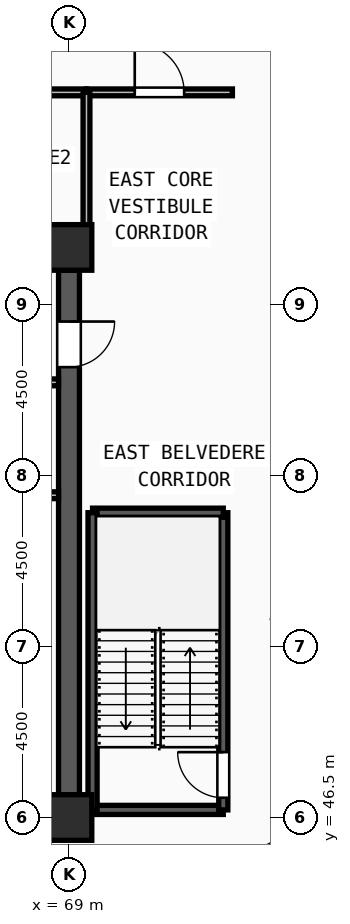
"""IFC4 building model, lengths in metres.
Left out: names, types, materials, properties, quantities, classifications, styles, units other than length and angle.
Written with IfcOpenShell. Run it as: python <this file> out.ifc"""

import sys

from ifc_helpers import new_model, si_unit, direction, frame, frame_2d, origin, origin_2d, place, context, subcontext, project, spatial, rectangle, extrude, source, transform, mapped, element, fill, save


model = new_model("IFC4")
c1 = context("Model", 3, precision=1e-05, world=origin(), true_north=direction((0.0, 1.0)))
c2 = subcontext(c1, "Body", "Model", "MODEL_VIEW")
j1 = project(units=[si_unit("LENGTHUNIT", "METRE"), si_unit("PLANEANGLEUNIT", "RADIAN")], contexts=[c1])
p1 = place(None, origin())
s1 = spatial("IfcSite", under=j1, at=p1, CompositionType="ELEMENT")
p2 = place(p1, origin())
s2 = spatial("IfcBuilding", under=s1, at=p2, CompositionType="ELEMENT")
p3 = place(p2, frame((0.0, 0.0, 339.75)))
s3 = spatial("IfcBuildingStorey", under=s2, at=p3, CompositionType="ELEMENT", Elevation=339.75)
m1 = source(origin(), c2, "Body", "SweptSolid", [
    extrude(rectangle(XDim=1.2, YDim=1.2, at=origin_2d()), origin(), (0.0, 0.0, 1.0), 3.75),
])
for number, where, z_axis, x_axis in (
    (1, (69.0, 46.5, 0.0), (0.0, 0.0, 1.0), (1.0, 0.0, 0.0)),
    (2, (69.0, 61.5, 0.0), (0.0, 0.0, 1.0), (1.0, 0.0, 0.0)),
):
    element("IfcColumn", number, at=place(p3, frame(where, z_axis=z_axis, x_axis=x_axis)), inside=s3, PredefinedType="COLUMN", context=c2, shape_type="MappedRepresentation", body=[
        mapped(m1, transform((0.0, 0.0, 0.0), x_axis=(1.0, 0.0, 0.0), y_axis=(0.0, 1.0, 0.0), z_axis=(0.0, 0.0, 1.0), scale=1.0)),
    ])
p4 = place(p3, frame((69.0, 60.9, 0.0), z_axis=(0.0, 0.0, 1.0), x_axis=(0.0, -1.0, 0.0)))
e3 = element("IfcWall", 3, at=p4, inside=s3, PredefinedType="SHEAR", context=c2, shape_type="SweptSolid", body=[
    extrude(rectangle(XDim=13.8, YDim=0.55, at=frame_2d((6.9, 0.0))), origin(), (0.0, 0.0, 1.0), 3.57),
])
m2 = source(origin(), c2, "Body", "SweptSolid", [
    extrude(rectangle(XDim=1.2, YDim=2.2, at=frame_2d((0.6, 1.1))), frame((0.0, 0.285, 0.0), z_axis=(0.0, -1.0, 0.0), x_axis=(1.0, 0.0, 0.0)), (0.0, 0.0, 1.0), 0.57),
])
p5 = place(p4, frame((1.35, 0.0, 0.0)))
e4 = element("IfcOpeningElement", 4, at=p5, cuts=e3, PredefinedType="OPENING", context=c2, shape_type="MappedRepresentation", body=[
    mapped(m2, transform((0.0, 0.0, 0.0), x_axis=(1.0, 0.0, 0.0), y_axis=(0.0, 1.0, 0.0), z_axis=(0.0, 0.0, 1.0), scale=1.0)),
])
p6 = place(p3, frame((69.62, 46.7, 0.0), z_axis=(0.0, 0.0, 1.0), x_axis=(1.0, 0.0, 0.0)))
e5 = element("IfcWall", 5, at=p6, inside=s3, PredefinedType="SOLIDWALL", context=c2, shape_type="SweptSolid", body=[
    extrude(rectangle(XDim=3.44, YDim=0.24, at=frame_2d((1.72, 0.0))), origin(), (0.0, 0.0, 1.0), 3.57),
])
p7 = place(p3, frame((73.06, 46.7, 0.0), z_axis=(0.0, 0.0, 1.0), x_axis=(0.0, 1.0, 0.0)))
e6 = element("IfcWall", 6, at=p7, inside=s3, PredefinedType="SOLIDWALL", context=c2, shape_type="SweptSolid", body=[
    extrude(rectangle(XDim=7.82, YDim=0.24, at=frame_2d((3.91, 0.0))), origin(), (0.0, 0.0, 1.0), 3.57),
])
m3 = source(origin(), c2, "Body", "SweptSolid", [
    extrude(rectangle(XDim=1.2, YDim=2.2, at=frame_2d((0.6, 1.1))), frame((0.0, 0.13, 0.0), z_axis=(0.0, -1.0, 0.0), x_axis=(1.0, 0.0, 0.0)), (0.0, 0.0, 1.0), 0.26),
])
p8 = place(p7, frame((0.32, 0.0, 0.0)))
e7 = element("IfcOpeningElement", 7, at=p8, cuts=e6, PredefinedType="OPENING", context=c2, shape_type="MappedRepresentation", body=[
    mapped(m3, transform((0.0, 0.0, 0.0), x_axis=(1.0, 0.0, 0.0), y_axis=(0.0, 1.0, 0.0), z_axis=(0.0, 0.0, 1.0), scale=1.0)),
])
p9 = place(p3, frame((73.06, 54.52, 0.0), z_axis=(0.0, 0.0, 1.0), x_axis=(-1.0, 0.0, 0.0)))
e8 = element("IfcWall", 8, at=p9, inside=s3, PredefinedType="SOLIDWALL", context=c2, shape_type="SweptSolid", body=[
    extrude(rectangle(XDim=3.44, YDim=0.24, at=frame_2d((1.72, 0.0))), origin(), (0.0, 0.0, 1.0), 3.57),
])
p10 = place(p3, frame((69.62, 54.52, 0.0), z_axis=(0.0, 0.0, 1.0), x_axis=(0.0, -1.0, 0.0)))
e9 = element("IfcWall", 9, at=p10, inside=s3, PredefinedType="SOLIDWALL", context=c2, shape_type="SweptSolid", body=[
    extrude(rectangle(XDim=7.82, YDim=0.24, at=frame_2d((3.91, 0.0))), origin(), (0.0, 0.0, 1.0), 3.57),
])
p11 = place(p3, frame((64.54, 54.98, 0.0), z_axis=(0.0, 0.0, 1.0), x_axis=(1.0, 0.0, 0.0)))
e10 = element("IfcWall", 10, at=p11, inside=s3, PredefinedType="PARTITIONING", context=c2, shape_type="SweptSolid", body=[
    extrude(rectangle(XDim=4.185, YDim=0.18, at=frame_2d((2.093, 0.0))), origin(), (0.0, 0.0, 1.0), 3.57),
])
m4 = source(origin(), c2, "Body", "SweptSolid", [
    extrude(rectangle(XDim=1.0, YDim=2.2, at=frame_2d((0.5, 1.1))), frame((0.0, 0.1, 0.0), z_axis=(0.0, -1.0, 0.0), x_axis=(1.0, 0.0, 0.0)), (0.0, 0.0, 1.0), 0.2),
])
p12 = place(p11, frame((1.495, 0.0, 0.0)))
e11 = element("IfcOpeningElement", 11, at=p12, cuts=e10, PredefinedType="OPENING", context=c2, shape_type="MappedRepresentation", body=[
    mapped(m4, transform((0.0, 0.0, 0.0), x_axis=(1.0, 0.0, 0.0), y_axis=(0.0, 1.0, 0.0), z_axis=(0.0, 0.0, 1.0), scale=1.0)),
])
p13 = place(p3, frame((65.92, 65.58, 0.0), z_axis=(0.0, 0.0, 1.0), x_axis=(1.0, 0.0, 0.0)))
e12 = element("IfcWall", 12, at=p13, inside=s3, PredefinedType="PARTITIONING", context=c2, shape_type="SweptSolid", body=[
    extrude(rectangle(XDim=3.54, YDim=0.18, at=frame_2d((1.77, 0.0))), origin(), (0.0, 0.0, 1.0), 3.57),
])
p14 = place(p13, frame((1.27, 0.0, 0.0)))
e13 = element("IfcOpeningElement", 13, at=p14, cuts=e12, PredefinedType="OPENING", context=c2, shape_type="MappedRepresentation", body=[
    mapped(m4, transform((0.0, 0.0, 0.0), x_axis=(1.0, 0.0, 0.0), y_axis=(0.0, 1.0, 0.0), z_axis=(0.0, 0.0, 1.0), scale=1.0)),
])
p15 = place(p3, frame((69.46, 65.58, 0.0), z_axis=(0.0, 0.0, 1.0), x_axis=(1.0, 0.0, 0.0)))
e14 = element("IfcWall", 14, at=p15, inside=s3, PredefinedType="PARTITIONING", context=c2, shape_type="SweptSolid", body=[
    extrude(rectangle(XDim=3.84, YDim=0.18, at=frame_2d((1.92, 0.0))), origin(), (0.0, 0.0, 1.0), 3.57),
])
m5 = source(origin(), c2, "Body", "SweptSolid", [
    extrude(rectangle(XDim=1.3, YDim=2.2, at=frame_2d((0.65, 1.1))), frame((0.0, 0.1, 0.0), z_axis=(0.0, -1.0, 0.0), x_axis=(1.0, 0.0, 0.0)), (0.0, 0.0, 1.0), 0.2),
])
p16 = place(p15, frame((1.27, 0.0, 0.0)))
e15 = element("IfcOpeningElement", 15, at=p16, cuts=e14, PredefinedType="OPENING", context=c2, shape_type="MappedRepresentation", body=[
    mapped(m5, transform((0.0, 0.0, 0.0), x_axis=(1.0, 0.0, 0.0), y_axis=(0.0, 1.0, 0.0), z_axis=(0.0, 0.0, 1.0), scale=1.0)),
])
p17 = place(p3, frame((69.46, 61.95, 0.0), z_axis=(0.0, 0.0, 1.0), x_axis=(0.0, 1.0, 0.0)))
e16 = element("IfcWall", 16, at=p17, inside=s3, PredefinedType="PARTITIONING", context=c2, shape_type="SweptSolid", body=[
    extrude(rectangle(XDim=3.63, YDim=0.18, at=frame_2d((1.815, 0.0))), origin(), (0.0, 0.0, 1.0), 3.57),
])
p18 = place(p3, frame((67.4, 57.95, 0.0), z_axis=(0.0, 0.0, 1.0), x_axis=(1.0, 0.0, 0.0)))
e17 = element("IfcWall", 17, at=p18, inside=s3, PredefinedType="PARTITIONING", context=c2, shape_type="SweptSolid", body=[
    extrude(rectangle(XDim=1.325, YDim=0.18, at=frame_2d((0.663, 0.0))), origin(), (0.0, 0.0, 1.0), 3.57),
])
m6 = source(origin(), c2, "Body", "SweptSolid", [
    extrude(rectangle(XDim=1.2, YDim=2.2, at=frame_2d((0.6, 1.1))), frame((0.0, 0.025, 0.0), z_axis=(0.0, -1.0, 0.0), x_axis=(1.0, 0.0, 0.0)), (0.0, 0.0, 1.0), 0.05),
])
p19 = place(p5, origin())
e18 = element("IfcDoor", 18, at=p19, inside=s3, OperationType="SINGLE_SWING_LEFT", PredefinedType="DOOR", context=c2, shape_type="MappedRepresentation", body=[
    mapped(m6, transform((0.0, 0.0, 0.0), x_axis=(1.0, 0.0, 0.0), y_axis=(0.0, 1.0, 0.0), z_axis=(0.0, 0.0, 1.0), scale=1.0)),
])
fill(e4, e18)
p20 = place(p8, origin())
e19 = element("IfcDoor", 19, at=p20, inside=s3, OperationType="SINGLE_SWING_RIGHT", PredefinedType="DOOR", context=c2, shape_type="MappedRepresentation", body=[
    mapped(m6, transform((0.0, 0.0, 0.0), x_axis=(1.0, 0.0, 0.0), y_axis=(0.0, 1.0, 0.0), z_axis=(0.0, 0.0, 1.0), scale=1.0)),
])
fill(e7, e19)
m7 = source(origin(), c2, "Body", "SweptSolid", [
    extrude(rectangle(XDim=1.3, YDim=2.2, at=frame_2d((0.65, 1.1))), frame((0.0, 0.025, 0.0), z_axis=(0.0, -1.0, 0.0), x_axis=(1.0, 0.0, 0.0)), (0.0, 0.0, 1.0), 0.05),
])
p21 = place(p16, origin())
e20 = element("IfcDoor", 20, at=p21, inside=s3, OperationType="SINGLE_SWING_LEFT", PredefinedType="DOOR", context=c2, shape_type="MappedRepresentation", body=[
    mapped(m7, transform((0.0, 0.0, 0.0), x_axis=(1.0, 0.0, 0.0), y_axis=(0.0, 1.0, 0.0), z_axis=(0.0, 0.0, 1.0), scale=1.0)),
])
fill(e15, e20)
save(model, sys.argv[1])
